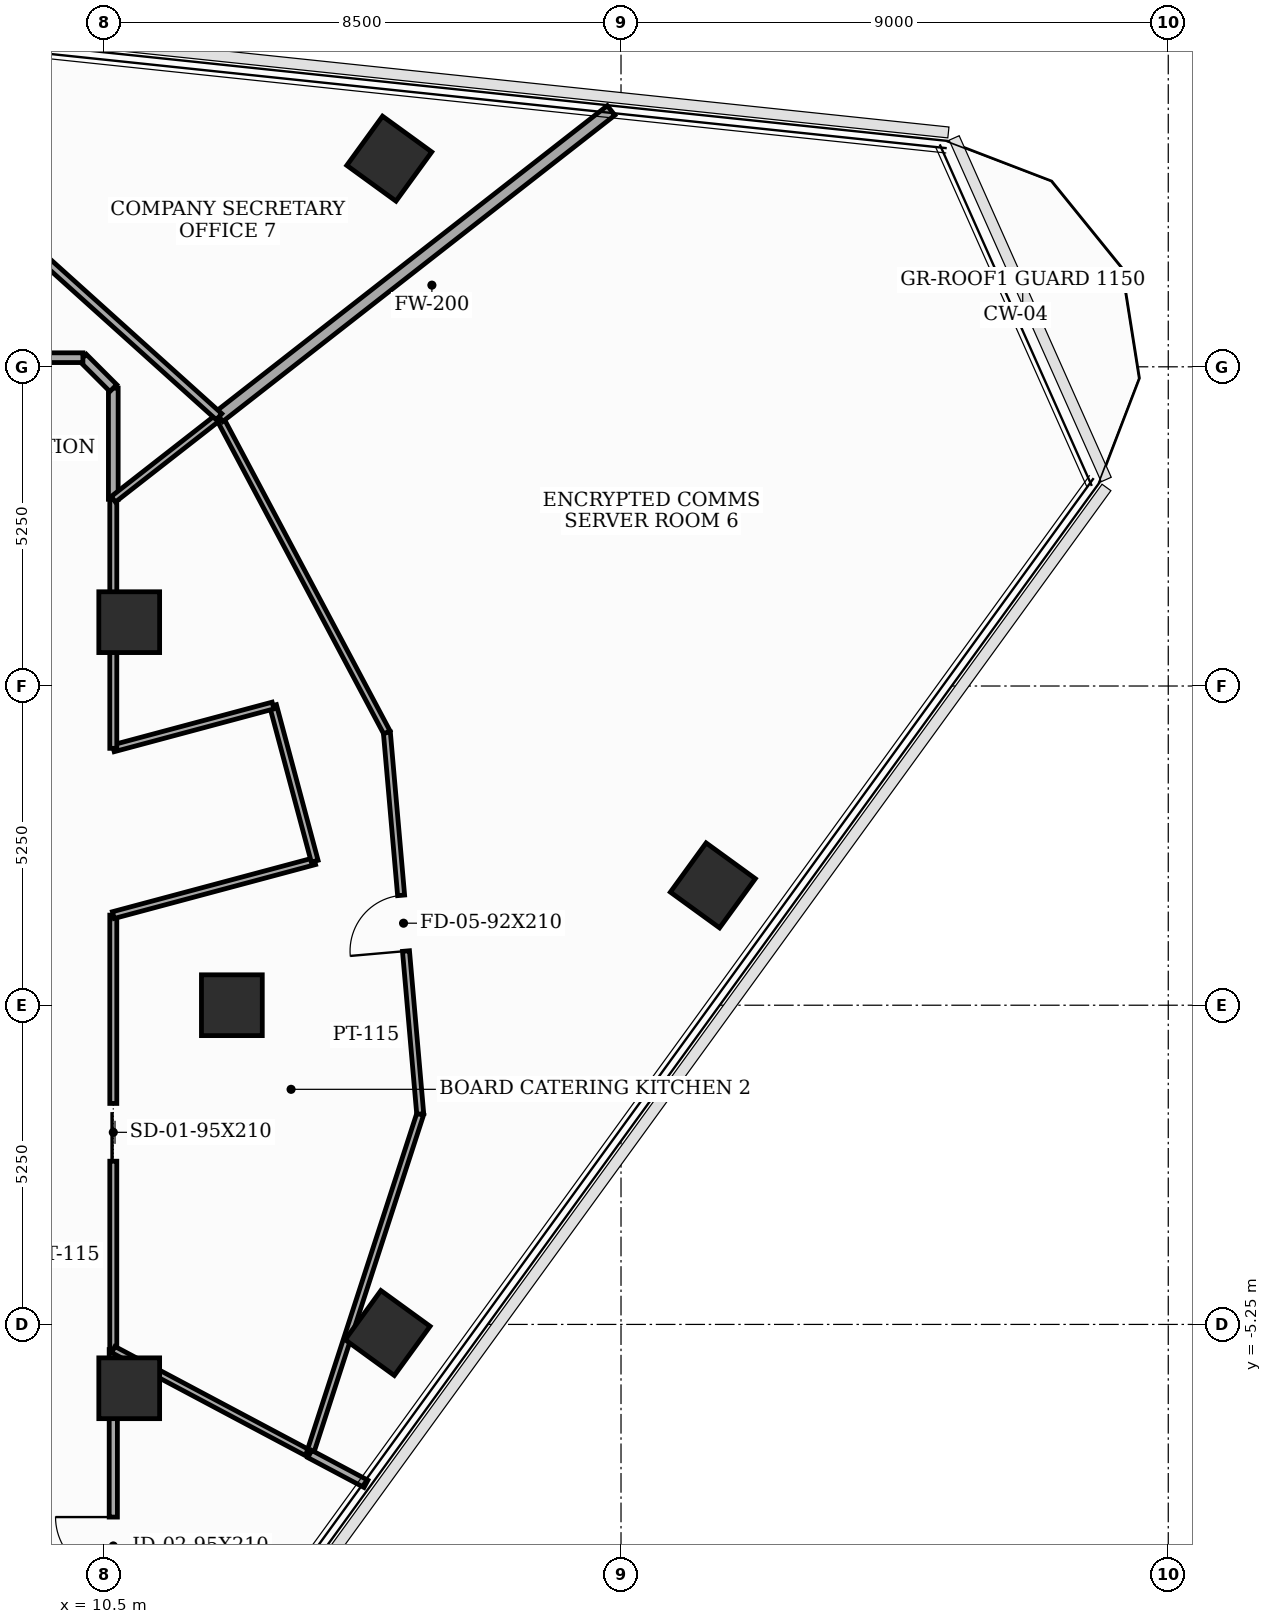
"""IFC4 building model, lengths in metres.
Left out: names, types, materials, properties, quantities, classifications, styles, units other than length and angle.
Written with IfcOpenShell. Run it as: python <this file> out.ifc"""

import sys

from ifc_helpers import new_model, si_unit, direction, frame, frame_2d, origin, origin_2d, place, context, subcontext, project, spatial, rectangle, extrude, element, fill, save


model = new_model("IFC4")
c1 = context("Model", 3, precision=1e-05, world=origin(), true_north=direction((0.0, 1.0)))
c2 = subcontext(c1, "Body", "Model", "MODEL_VIEW")
j1 = project(units=[si_unit("LENGTHUNIT", "METRE"), si_unit("PLANEANGLEUNIT", "RADIAN")], contexts=[c1])
p1 = place(None, origin())
s1 = spatial("IfcSite", under=j1, at=p1, CompositionType="ELEMENT")
p2 = place(p1, origin())
s2 = spatial("IfcBuilding", under=s1, at=p2, CompositionType="ELEMENT")
p3 = place(p2, frame((0.0, 0.0, 222.6)))
s3 = spatial("IfcBuildingStorey", under=s2, at=p3, CompositionType="ELEMENT", Elevation=222.6)
for number, where, z_axis, x_axis in (
    (1, (12.6, 0.0, 0.0), (0.0, 0.0, 1.0), (1.0, 0.0, 0.0)),
    (2, (10.912, 6.3, 0.0), (0.0, 0.0, 1.0), (1.0, 0.0, 0.0)),
    (3, (10.912, -6.3, 0.0), (0.0, 0.0, 1.0), (1.0, 0.0, 0.0)),
    (4, (15.161, -5.391, 0.0), (0.0, 0.0, 1.0), (0.588, 0.809, 0.0)),
    (5, (20.51, 1.971, 0.0), (0.0, 0.0, 1.0), (0.588, 0.809, 0.0)),
    (6, (15.188, 13.923, 0.0), (0.0, 0.0, 1.0), (0.588, 0.809, 0.0)),
):
    element("IfcColumn", number, at=place(p3, frame(where, z_axis=z_axis, x_axis=x_axis)), inside=s3, PredefinedType="COLUMN", context=c2, shape_type="SweptSolid", body=[
        extrude(rectangle(XDim=1.0, YDim=1.0, at=origin_2d()), origin(), (0.0, 0.0, 1.0), 3.7),
    ])
p4 = place(p3, frame((10.65, -5.663, 0.0), z_axis=(0.0, 0.0, 1.0), x_axis=(0.0, 1.0, 0.0)))
e7 = element("IfcWall", 7, at=p4, inside=s3, PredefinedType="PARTITIONING", context=c2, shape_type="SweptSolid", body=[
    extrude(rectangle(XDim=7.145, YDim=0.115, at=frame_2d((3.573, 0.0))), origin(), (0.0, 0.0, 1.0), 2.885),
])
p5 = place(p4, frame((3.097, 0.0, 0.0)))
e8 = element("IfcOpeningElement", 8, at=p5, cuts=e7, PredefinedType="OPENING", context=c2, shape_type="SweptSolid", body=[
    extrude(rectangle(XDim=0.95, YDim=2.1, at=frame_2d((0.475, 1.05))), frame((0.0, 0.067, 0.0), z_axis=(0.0, -1.0, 0.0), x_axis=(1.0, 0.0, 0.0)), (0.0, 0.0, 1.0), 0.135),
])
p6 = place(p3, frame((10.65, 1.482, 0.0), z_axis=(0.0, 0.0, 1.0), x_axis=(0.965961397105, 0.2586862565, 0.0)))
e9 = element("IfcWall", 9, at=p6, inside=s3, PredefinedType="PARTITIONING", context=c2, shape_type="SweptSolid", body=[
    extrude(rectangle(XDim=3.429, YDim=0.115, at=frame_2d((1.714, 0.0))), origin(), (0.0, 0.0, 1.0), 2.885),
])
p7 = place(p3, frame((13.962, 2.369, 0.0), z_axis=(0.0, 0.0, 1.0), x_axis=(-0.258413725385, 0.966034340245, 0.0)))
e10 = element("IfcWall", 10, at=p7, inside=s3, PredefinedType="PARTITIONING", context=c2, shape_type="SweptSolid", body=[
    extrude(rectangle(XDim=2.65, YDim=0.115, at=frame_2d((1.325, 0.0))), origin(), (0.0, 0.0, 1.0), 3.5),
])
p8 = place(p3, frame((13.277, 4.929, 0.0), z_axis=(0.0, 0.0, 1.0), x_axis=(-0.965934830229, -0.258785439601, 0.0)))
e11 = element("IfcWall", 11, at=p8, inside=s3, PredefinedType="PARTITIONING", context=c2, shape_type="SweptSolid", body=[
    extrude(rectangle(XDim=2.72, YDim=0.115, at=frame_2d((1.36, 0.0))), origin(), (0.0, 0.0, 1.0), 2.885),
])
p9 = place(p3, frame((10.65, 4.225, 0.0), z_axis=(0.0, 0.0, 1.0), x_axis=(0.0, 1.0, 0.0)))
e12 = element("IfcWall", 12, at=p9, inside=s3, PredefinedType="PARTITIONING", context=c2, shape_type="SweptSolid", body=[
    extrude(rectangle(XDim=4.096, YDim=0.115, at=frame_2d((2.048, 0.0))), origin(), (0.0, 0.0, 1.0), 2.885),
])
p10 = place(p3, frame((10.65, -10.15, 0.0), z_axis=(0.0, 0.0, 1.0), x_axis=(0.0, 1.0, 0.0)))
e13 = element("IfcWall", 13, at=p10, inside=s3, PredefinedType="PARTITIONING", context=c2, shape_type="SweptSolid", body=[
    extrude(rectangle(XDim=4.487, YDim=0.135, at=frame_2d((2.243, 0.0))), origin(), (0.0, 0.0, 1.0), 2.885),
])
p11 = place(p10, frame((0.781, 0.0, 0.0)))
e14 = element("IfcOpeningElement", 14, at=p11, cuts=e13, PredefinedType="OPENING", context=c2, shape_type="SweptSolid", body=[
    extrude(rectangle(XDim=0.95, YDim=2.1, at=frame_2d((0.475, 1.05))), frame((0.0, 0.077, 0.0), z_axis=(0.0, -1.0, 0.0), x_axis=(1.0, 0.0, 0.0)), (0.0, 0.0, 1.0), 0.155),
])
p12 = place(p3, frame((10.65, 8.321, 0.0), z_axis=(0.0, 0.0, 1.0), x_axis=(0.0, 1.0, 0.0)))
e15 = element("IfcWall", 15, at=p12, inside=s3, PredefinedType="PARTITIONING", context=c2, shape_type="SweptSolid", body=[
    extrude(rectangle(XDim=1.829, YDim=0.16, at=frame_2d((0.915, 0.0))), origin(), (0.0, 0.0, 1.0), 3.5),
])
p13 = place(p3, frame((10.65, 10.15, 0.0), z_axis=(0.0, 0.0, 1.0), x_axis=(-0.707106781187, 0.707106781187, 0.0)))
e16 = element("IfcWall", 16, at=p13, inside=s3, PredefinedType="PARTITIONING", context=c2, shape_type="SweptSolid", body=[
    extrude(rectangle(XDim=0.707, YDim=0.16, at=frame_2d((0.354, 0.0))), origin(), (0.0, 0.0, 1.0), 3.5),
])
p14 = place(p3, frame((10.15, 10.65, 0.0), z_axis=(0.0, 0.0, 1.0), x_axis=(-1.0, 0.0, 0.0)))
e17 = element("IfcWall", 17, at=p14, inside=s3, PredefinedType="PARTITIONING", context=c2, shape_type="SweptSolid", body=[
    extrude(rectangle(XDim=11.3, YDim=0.16, at=frame_2d((5.65, 0.0))), origin(), (0.0, 0.0, 1.0), 2.885),
])
p15 = place(p14, frame((6.506, 0.0, 0.0)))
e18 = element("IfcOpeningElement", 18, at=p15, cuts=e17, PredefinedType="OPENING", context=c2, shape_type="SweptSolid", body=[
    extrude(rectangle(XDim=1.0, YDim=2.15, at=frame_2d((0.5, 1.075))), frame((0.0, 0.09, 0.0), z_axis=(0.0, -1.0, 0.0), x_axis=(1.0, 0.0, 0.0)), (0.0, 0.0, 1.0), 0.18),
])
p16 = place(p3, frame((10.65, -5.663, 0.0), z_axis=(0.0, 0.0, 1.0), x_axis=(0.882952413676, -0.469462496036, 0.0)))
e19 = element("IfcWall", 19, at=p16, inside=s3, PredefinedType="PARTITIONING", context=c2, shape_type="SweptSolid", body=[
    extrude(rectangle(XDim=3.659, YDim=0.115, at=frame_2d((1.83, 0.0))), origin(), (0.0, 0.0, 1.0), 2.885),
])
p17 = place(p3, frame((13.881, -7.381, 0.0), z_axis=(0.0, 0.0, 1.0), x_axis=(0.309006266506, 0.951060001924, 0.0)))
e20 = element("IfcWall", 20, at=p17, inside=s3, PredefinedType="PARTITIONING", context=c2, shape_type="SweptSolid", body=[
    extrude(rectangle(XDim=5.88, YDim=0.115, at=frame_2d((2.94, 0.0))), origin(), (0.0, 0.0, 1.0), 2.985),
])
p18 = place(p3, frame((15.698, -1.789, 0.0), z_axis=(0.0, 0.0, 1.0), x_axis=(-0.087153009445, 0.996194937221, 0.0)))
e21 = element("IfcWall", 21, at=p18, inside=s3, PredefinedType="PARTITIONING", context=c2, shape_type="SweptSolid", body=[
    extrude(rectangle(XDim=6.3, YDim=0.115, at=frame_2d((3.15, 0.0))), origin(), (0.0, 0.0, 1.0), 2.985),
])
p19 = place(p18, frame((2.69, 0.0, 0.0)))
e22 = element("IfcOpeningElement", 22, at=p19, cuts=e21, PredefinedType="OPENING", context=c2, shape_type="SweptSolid", body=[
    extrude(rectangle(XDim=0.92, YDim=2.1, at=frame_2d((0.46, 1.05))), frame((0.0, 0.067, 0.0), z_axis=(0.0, -1.0, 0.0), x_axis=(1.0, 0.0, 0.0)), (0.0, 0.0, 1.0), 0.135),
])
p20 = place(p3, frame((15.149, 4.487, 0.0), z_axis=(0.0, 0.0, 1.0), x_axis=(-0.469396049876, 0.882987739643, 0.0)))
e23 = element("IfcWall", 23, at=p20, inside=s3, PredefinedType="PARTITIONING", context=c2, shape_type="SweptSolid", body=[
    extrude(rectangle(XDim=5.88, YDim=0.115, at=frame_2d((2.94, 0.0))), origin(), (0.0, 0.0, 1.0), 2.985),
])
p21 = place(p3, frame((12.389, 9.679, 0.0), z_axis=(0.0, 0.0, 1.0), x_axis=(-0.788177008199, -0.615448619908, 0.0)))
e24 = element("IfcWall", 24, at=p21, inside=s3, PredefinedType="PARTITIONING", context=c2, shape_type="SweptSolid", body=[
    extrude(rectangle(XDim=2.206, YDim=0.115, at=frame_2d((1.103, 0.0))), origin(), (0.0, 0.0, 1.0), 3.5),
])
p22 = place(p3, frame((14.805, -7.872, 0.0), z_axis=(0.0, 0.0, 1.0), x_axis=(-0.883242549552, 0.468916409033, 0.0)))
e25 = element("IfcWall", 25, at=p22, inside=s3, PredefinedType="PARTITIONING", context=c2, shape_type="SweptSolid", body=[
    extrude(rectangle(XDim=1.046, YDim=0.135, at=frame_2d((0.523, 0.0))), origin(), (0.0, 0.0, 1.0), 3.035),
])
p23 = place(p3, frame((18.836, 14.716, 0.0), z_axis=(0.0, 0.0, 1.0), x_axis=(-0.78799903942, -0.615676468507, 0.0)))
e26 = element("IfcWall", 26, at=p23, inside=s3, PredefinedType="SOLIDWALL", context=c2, shape_type="SweptSolid", body=[
    extrude(rectangle(XDim=8.182, YDim=0.2, at=frame_2d((4.091, 0.0))), origin(), (0.0, 0.0, 1.0), 2.985),
])
p24 = place(p3, frame((8.019, 13.614, 0.0), z_axis=(0.0, 0.0, 1.0), x_axis=(0.743110388877, -0.669168850099, 0.0)))
e27 = element("IfcWall", 27, at=p24, inside=s3, PredefinedType="PARTITIONING", context=c2, shape_type="SweptSolid", body=[
    extrude(rectangle(XDim=5.881, YDim=0.135, at=frame_2d((2.94, 0.0))), origin(), (0.0, 0.0, 1.0), 3.5),
])
p25 = place(p5, origin())
e28 = element("IfcDoor", 28, at=p25, inside=s3, OperationType="SLIDING_TO_LEFT", PredefinedType="DOOR", context=c2, shape_type="SweptSolid", body=[
    extrude(rectangle(XDim=0.95, YDim=2.1, at=frame_2d((0.475, 1.05))), frame((0.0, 0.025, 0.0), z_axis=(0.0, -1.0, 0.0), x_axis=(1.0, 0.0, 0.0)), (0.0, 0.0, 1.0), 0.05),
])
fill(e8, e28)
p26 = place(p11, origin())
e29 = element("IfcDoor", 29, at=p26, inside=s3, OperationType="SINGLE_SWING_RIGHT", PredefinedType="DOOR", context=c2, shape_type="SweptSolid", body=[
    extrude(rectangle(XDim=0.95, YDim=2.1, at=frame_2d((0.475, 1.05))), frame((0.0, 0.025, 0.0), z_axis=(0.0, -1.0, 0.0), x_axis=(1.0, 0.0, 0.0)), (0.0, 0.0, 1.0), 0.05),
])
fill(e14, e29)
p27 = place(p19, origin())
e30 = element("IfcDoor", 30, at=p27, inside=s3, OperationType="SINGLE_SWING_LEFT", PredefinedType="DOOR", context=c2, shape_type="SweptSolid", body=[
    extrude(rectangle(XDim=0.92, YDim=2.1, at=frame_2d((0.46, 1.05))), frame((0.0, 0.025, 0.0), z_axis=(0.0, -1.0, 0.0), x_axis=(1.0, 0.0, 0.0)), (0.0, 0.0, 1.0), 0.05),
])
fill(e22, e30)
save(model, sys.argv[1])
